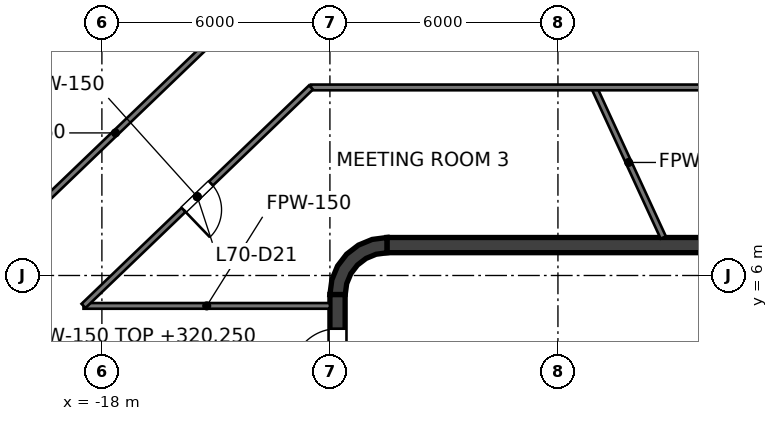
"""IFC4 building model, lengths in metres.
Left out: names, types, materials, properties, quantities, classifications, styles, units other than length and angle.
Written with IfcOpenShell. Run it as: python <this file> out.ifc"""

import sys

from ifc_helpers import new_model, si_unit, direction, frame, frame_2d, origin, place, context, subcontext, project, spatial, polyline, rectangle, outline, extrude, element, fill, save


model = new_model("IFC4")
c1 = context("Model", 3, precision=1e-05, world=origin(), true_north=direction((0.0, 1.0)))
c2 = subcontext(c1, "Body", "Model", "MODEL_VIEW")
j1 = project(units=[si_unit("LENGTHUNIT", "METRE"), si_unit("PLANEANGLEUNIT", "RADIAN")], contexts=[c1])
p1 = place(None, origin())
s1 = spatial("IfcSite", under=j1, at=p1, CompositionType="ELEMENT")
p2 = place(p1, origin())
s2 = spatial("IfcBuilding", under=s1, at=p2, CompositionType="ELEMENT")
p3 = place(p2, frame((0.0, 0.0, 316.4)))
s3 = spatial("IfcBuildingStorey", under=s2, at=p3, CompositionType="ELEMENT", Elevation=316.4)
p4 = place(p3, frame((-10.5, 6.8, 0.0), z_axis=(0.0, 0.0, 1.0), x_axis=(1.0, 0.0, 0.0)))
e1 = element("IfcWall", 1, at=p4, inside=s3, PredefinedType="SHEAR", context=c2, shape_type="SweptSolid", body=[
    extrude(rectangle(XDim=21.0, YDim=0.4, at=frame_2d((10.5, 0.0))), origin(), (0.0, 0.0, 1.0), 4.0),
])
p5 = place(p3, frame((-11.8, -5.5, 0.0), z_axis=(0.0, 0.0, 1.0), x_axis=(0.0, 1.0, 0.0)))
e2 = element("IfcWall", 2, at=p5, inside=s3, PredefinedType="SHEAR", context=c2, shape_type="SweptSolid", body=[
    extrude(rectangle(XDim=11.0, YDim=0.4, at=frame_2d((5.5, 0.0))), origin(), (0.0, 0.0, 1.0), 4.0),
])
p6 = place(p5, frame((5.0, 0.0, 0.0)))
e3 = element("IfcOpeningElement", 3, at=p6, cuts=e2, PredefinedType="OPENING", context=c2, shape_type="SweptSolid", body=[
    extrude(rectangle(XDim=1.0, YDim=2.1, at=frame_2d((0.5, 1.05))), frame((0.0, 0.2, 0.0), z_axis=(0.0, -1.0, 0.0), x_axis=(1.0, 0.0, 0.0)), (0.0, 0.0, 1.0), 0.4),
])
p7 = place(p5, frame((0.9, 0.0, 0.0)))
e4 = element("IfcOpeningElement", 4, at=p7, cuts=e2, PredefinedType="OPENING", context=c2, shape_type="SweptSolid", body=[
    extrude(rectangle(XDim=1.2, YDim=2.1, at=frame_2d((0.6, 1.05))), frame((0.0, 0.2, 0.0), z_axis=(0.0, -1.0, 0.0), x_axis=(1.0, 0.0, 0.0)), (0.0, 0.0, 1.0), 0.4),
])
p8 = place(p5, frame((8.9, 0.0, 0.0)))
e5 = element("IfcOpeningElement", 5, at=p8, cuts=e2, PredefinedType="OPENING", context=c2, shape_type="SweptSolid", body=[
    extrude(rectangle(XDim=1.2, YDim=2.1, at=frame_2d((0.6, 1.05))), frame((0.0, 0.2, 0.0), z_axis=(0.0, -1.0, 0.0), x_axis=(1.0, 0.0, 0.0)), (0.0, 0.0, 1.0), 0.4),
])
p9 = place(p3, origin())
e6 = element("IfcWall", 6, at=p9, inside=s3, PredefinedType="SHEAR", context=c2, shape_type="SweptSolid", body=[
    extrude(outline(polyline([(-12.0, 5.5), (-11.596, 5.5), (-11.559, 5.784), (-11.45, 6.048), (-11.275, 6.275), (-11.048, 6.45), (-10.784, 6.559), (-10.5, 6.596), (-10.5, 7.0), (-10.888, 6.949), (-11.25, 6.799), (-11.561, 6.561), (-11.799, 6.25), (-11.949, 5.888), (-12.0, 5.5)])), origin(), (0.0, 0.0, 1.0), 4.0),
])
p10 = place(p3, frame((-9.0, 4.1, 0.0), z_axis=(0.0, 0.0, 1.0), x_axis=(0.0, 1.0, 0.0)))
e7 = element("IfcWall", 7, at=p10, inside=s3, PredefinedType="SOLIDWALL", context=c2, shape_type="SweptSolid", body=[
    extrude(rectangle(XDim=2.5, YDim=0.25, at=frame_2d((1.25, 0.0))), origin(), (0.0, 0.0, 1.0), 3.85),
])
p11 = place(p10, frame((0.65, 0.0, 0.0)))
e8 = element("IfcOpeningElement", 8, at=p11, cuts=e7, PredefinedType="OPENING", context=c2, shape_type="SweptSolid", body=[
    extrude(rectangle(XDim=1.2, YDim=2.1, at=frame_2d((0.6, 1.05))), frame((0.0, 0.125, 0.0), z_axis=(0.0, -1.0, 0.0), x_axis=(1.0, 0.0, 0.0)), (0.0, 0.0, 1.0), 0.25),
])
p12 = place(p3, frame((-3.15, 4.1, 0.0), z_axis=(0.0, 0.0, 1.0), x_axis=(0.0, 1.0, 0.0)))
e9 = element("IfcWall", 9, at=p12, inside=s3, PredefinedType="SOLIDWALL", context=c2, shape_type="SweptSolid", body=[
    extrude(rectangle(XDim=2.5, YDim=0.25, at=frame_2d((1.25, 0.0))), origin(), (0.0, 0.0, 1.0), 3.85),
])
p13 = place(p3, frame((-5.05, 10.949, 0.0), z_axis=(0.0, 0.0, 1.0), x_axis=(0.418762657012, -0.908095720226, 0.0)))
e10 = element("IfcWall", 10, at=p13, inside=s3, PredefinedType="PARTITIONING", context=c2, shape_type="SweptSolid", body=[
    extrude(rectangle(XDim=4.349, YDim=0.15, at=frame_2d((2.174, 0.0))), origin(), (0.0, 0.0, 1.0), 2.927),
])
p14 = place(p3, frame((-18.484, 5.2, 0.0), z_axis=(0.0, 0.0, 1.0), x_axis=(1.0, 0.0, 0.0)))
e11 = element("IfcWall", 11, at=p14, inside=s3, PredefinedType="PARTITIONING", context=c2, shape_type="SweptSolid", body=[
    extrude(rectangle(XDim=6.484, YDim=0.15, at=frame_2d((3.242, 0.0))), origin(), (0.0, 0.0, 1.0), 3.076),
])
p15 = place(p3, frame((-12.498, 10.949, 0.0), z_axis=(0.0, 0.0, 1.0), x_axis=(1.0, 0.0, 0.0)))
e12 = element("IfcWall", 12, at=p15, inside=s3, PredefinedType="PARTITIONING", context=c2, shape_type="SweptSolid", body=[
    extrude(rectangle(XDim=24.996, YDim=0.15, at=frame_2d((12.498, 0.0))), origin(), (0.0, 0.0, 1.0), 2.927),
])
p16 = place(p15, frame((11.948, 0.0, 0.0)))
e13 = element("IfcOpeningElement", 13, at=p16, cuts=e12, PredefinedType="OPENING", context=c2, shape_type="SweptSolid", body=[
    extrude(rectangle(XDim=1.0, YDim=2.1, at=frame_2d((0.5, 1.05))), frame((0.0, 0.075, 0.0), z_axis=(0.0, -1.0, 0.0), x_axis=(1.0, 0.0, 0.0)), (0.0, 0.0, 1.0), 0.15),
])
p17 = place(p3, frame((-18.484, 5.2, 0.0), z_axis=(0.0, 0.0, 1.0), x_axis=(0.721258572397, 0.692665916401, 0.0)))
e14 = element("IfcWall", 14, at=p17, inside=s3, PredefinedType="PARTITIONING", context=c2, shape_type="SweptSolid", body=[
    extrude(rectangle(XDim=8.3, YDim=0.15, at=frame_2d((4.15, 0.0))), origin(), (0.0, 0.0, 1.0), 3.076),
])
p18 = place(p17, frame((3.65, 0.0, 0.0)))
e15 = element("IfcOpeningElement", 15, at=p18, cuts=e14, PredefinedType="OPENING", context=c2, shape_type="SweptSolid", body=[
    extrude(rectangle(XDim=1.0, YDim=2.1, at=frame_2d((0.5, 1.05))), frame((0.0, 0.075, 0.0), z_axis=(0.0, -1.0, 0.0), x_axis=(1.0, 0.0, 0.0)), (0.0, 0.0, 1.0), 0.15),
])
p19 = place(p3, frame((-21.7, 5.855, 0.0), z_axis=(0.0, 0.0, 1.0), x_axis=(0.721260272646, 0.692664145963, 0.0)))
e16 = element("IfcWall", 16, at=p19, inside=s3, PredefinedType="PARTITIONING", context=c2, shape_type="SweptSolid", body=[
    extrude(rectangle(XDim=11.252, YDim=0.15, at=frame_2d((5.626, 0.0))), origin(), (0.0, 0.0, 1.0), 3.076),
])
p20 = place(p11, origin())
e17 = element("IfcDoor", 17, at=p20, inside=s3, OperationType="SINGLE_SWING_RIGHT", PredefinedType="DOOR", context=c2, shape_type="SweptSolid", body=[
    extrude(rectangle(XDim=1.2, YDim=2.1, at=frame_2d((0.6, 1.05))), frame((0.0, 0.025, 0.0), z_axis=(0.0, -1.0, 0.0), x_axis=(1.0, 0.0, 0.0)), (0.0, 0.0, 1.0), 0.05),
])
fill(e8, e17)
p21 = place(p8, origin())
e18 = element("IfcDoor", 18, at=p21, inside=s3, OperationType="SINGLE_SWING_LEFT", PredefinedType="DOOR", context=c2, shape_type="SweptSolid", body=[
    extrude(rectangle(XDim=1.2, YDim=2.1, at=frame_2d((0.6, 1.05))), frame((0.0, 0.025, 0.0), z_axis=(0.0, -1.0, 0.0), x_axis=(1.0, 0.0, 0.0)), (0.0, 0.0, 1.0), 0.05),
])
fill(e5, e18)
p22 = place(p18, origin())
e19 = element("IfcDoor", 19, at=p22, inside=s3, OperationType="SINGLE_SWING_LEFT", PredefinedType="DOOR", context=c2, shape_type="SweptSolid", body=[
    extrude(rectangle(XDim=1.0, YDim=2.1, at=frame_2d((0.5, 1.05))), frame((0.0, 0.025, 0.0), z_axis=(0.0, -1.0, 0.0), x_axis=(1.0, 0.0, 0.0)), (0.0, 0.0, 1.0), 0.05),
])
fill(e15, e19)
save(model, sys.argv[1])
